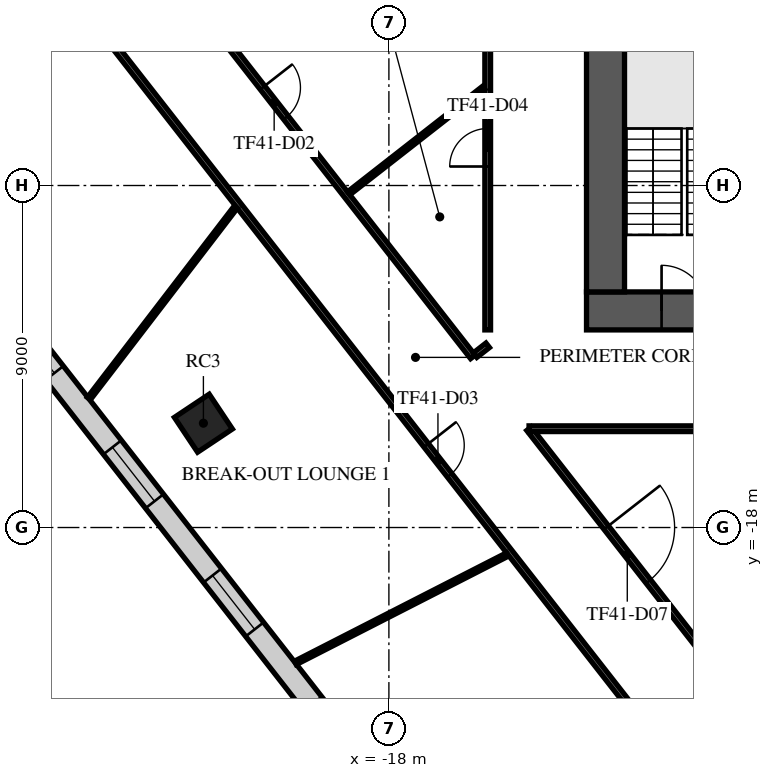
"""IFC4 building model, lengths in metres.
Left out: names, types, materials, properties, quantities, classifications, styles, units other than length and angle.
Written with IfcOpenShell. Run it as: python <this file> out.ifc"""

import sys

from ifc_helpers import new_model, si_unit, direction, frame, frame_2d, origin, origin_2d, place, context, subcontext, project, spatial, rectangle, extrude, element, fill, save


model = new_model("IFC4")
c1 = context("Model", 3, precision=1e-05, world=origin(), true_north=direction((0.0, 1.0)))
c2 = subcontext(c1, "Body", "Model", "MODEL_VIEW")
j1 = project(units=[si_unit("LENGTHUNIT", "METRE"), si_unit("PLANEANGLEUNIT", "RADIAN")], contexts=[c1])
p1 = place(None, origin())
s1 = spatial("IfcSite", under=j1, at=p1, CompositionType="ELEMENT")
p2 = place(p1, origin())
s2 = spatial("IfcBuilding", under=s1, at=p2, CompositionType="ELEMENT")
p3 = place(p2, frame((0.0, 0.0, 175.7)))
s3 = spatial("IfcBuildingStorey", under=s2, at=p3, CompositionType="ELEMENT", Elevation=175.7)
p4 = place(p3, frame((-22.881, -15.255, 0.0), z_axis=(0.0, 0.0, 1.0), x_axis=(0.832028680356, 0.55473261583, 0.0)))
e1 = element("IfcColumn", 1, at=p4, inside=s3, PredefinedType="COLUMN", context=c2, shape_type="SweptSolid", body=[
    extrude(rectangle(XDim=1.1, YDim=1.1, at=origin_2d()), origin(), (0.0, 0.0, 1.0), 4.0),
])
p5 = place(p3, frame((-12.8, -12.3, 0.0), z_axis=(0.0, 0.0, 1.0), x_axis=(1.0, 0.0, 0.0)))
e2 = element("IfcWall", 2, at=p5, inside=s3, PredefinedType="SHEAR", context=c2, shape_type="SweptSolid", body=[
    extrude(rectangle(XDim=25.6, YDim=1.0, at=frame_2d((12.8, 0.0))), origin(), (0.0, 0.0, 1.0), 3.6),
])
p6 = place(p5, frame((7.7, 0.0, 0.0)))
e3 = element("IfcOpeningElement", 3, at=p6, cuts=e2, PredefinedType="OPENING", context=c2, shape_type="SweptSolid", body=[
    extrude(rectangle(XDim=2.0, YDim=2.1, at=frame_2d((1.0, 1.05))), frame((0.0, 0.51, 0.0), z_axis=(0.0, -1.0, 0.0), x_axis=(1.0, 0.0, 0.0)), (0.0, 0.0, 1.0), 1.02),
])
p7 = place(p5, frame((17.825, 0.0, 0.0)))
e4 = element("IfcOpeningElement", 4, at=p7, cuts=e2, PredefinedType="OPENING", context=c2, shape_type="SweptSolid", body=[
    extrude(rectangle(XDim=1.2, YDim=2.1, at=frame_2d((0.6, 1.05))), frame((0.0, 0.51, 0.0), z_axis=(0.0, -1.0, 0.0), x_axis=(1.0, 0.0, 0.0)), (0.0, 0.0, 1.0), 1.02),
])
p8 = place(p5, frame((1.975, 0.0, 0.0)))
e5 = element("IfcOpeningElement", 5, at=p8, cuts=e2, PredefinedType="OPENING", context=c2, shape_type="SweptSolid", body=[
    extrude(rectangle(XDim=1.2, YDim=2.1, at=frame_2d((0.6, 1.05))), frame((0.0, 0.51, 0.0), z_axis=(0.0, -1.0, 0.0), x_axis=(1.0, 0.0, 0.0)), (0.0, 0.0, 1.0), 1.02),
])
p9 = place(p5, frame((22.425, 0.0, 0.0)))
e6 = element("IfcOpeningElement", 6, at=p9, cuts=e2, PredefinedType="OPENING", context=c2, shape_type="SweptSolid", body=[
    extrude(rectangle(XDim=1.2, YDim=2.1, at=frame_2d((0.6, 1.05))), frame((0.0, 0.51, 0.0), z_axis=(0.0, -1.0, 0.0), x_axis=(1.0, 0.0, 0.0)), (0.0, 0.0, 1.0), 1.02),
])
p10 = place(p3, frame((-12.3, -11.8, 0.0), z_axis=(0.0, 0.0, 1.0), x_axis=(0.0, 1.0, 0.0)))
e7 = element("IfcWall", 7, at=p10, inside=s3, PredefinedType="SHEAR", context=c2, shape_type="SweptSolid", body=[
    extrude(rectangle(XDim=23.6, YDim=1.0, at=frame_2d((11.8, 0.0))), origin(), (0.0, 0.0, 1.0), 3.6),
])
p11 = place(p10, frame((10.6, 0.0, 0.0)))
e8 = element("IfcOpeningElement", 8, at=p11, cuts=e7, PredefinedType="OPENING", context=c2, shape_type="SweptSolid", body=[
    extrude(rectangle(XDim=2.4, YDim=2.4, at=frame_2d((1.2, 1.2))), frame((0.0, 0.51, 0.0), z_axis=(0.0, -1.0, 0.0), x_axis=(1.0, 0.0, 0.0)), (0.0, 0.0, 1.0), 1.02),
])
p12 = place(p3, frame((-36.503, -1.52, 0.0), z_axis=(0.0, 0.0, 1.0), x_axis=(0.615658293455, -0.788013239546, 0.0)))
e9 = element("IfcWall", 9, at=p12, inside=s3, PredefinedType="STANDARD", context=c2, shape_type="SweptSolid", body=[
    extrude(rectangle(XDim=42.552, YDim=0.6, at=frame_2d((21.276, 0.0))), origin(), (0.0, 0.0, 1.0), 3.6),
])
p13 = place(p12, frame((1.178, 0.0, 0.9)))
e10 = element("IfcOpeningElement", 10, at=p13, cuts=e9, PredefinedType="OPENING", context=c2, shape_type="SweptSolid", body=[
    extrude(rectangle(XDim=1.8, YDim=2.1, at=frame_2d((0.9, 1.05))), frame((0.0, 0.31, 0.0), z_axis=(0.0, -1.0, 0.0), x_axis=(1.0, 0.0, 0.0)), (0.0, 0.0, 1.0), 0.62),
])
p14 = place(p12, frame((5.396, 0.0, 0.9)))
e11 = element("IfcOpeningElement", 11, at=p14, cuts=e9, PredefinedType="OPENING", context=c2, shape_type="SweptSolid", body=[
    extrude(rectangle(XDim=1.8, YDim=2.1, at=frame_2d((0.9, 1.05))), frame((0.0, 0.31, 0.0), z_axis=(0.0, -1.0, 0.0), x_axis=(1.0, 0.0, 0.0)), (0.0, 0.0, 1.0), 0.62),
])
p15 = place(p12, frame((9.676, 0.0, 0.9)))
e12 = element("IfcOpeningElement", 12, at=p15, cuts=e9, PredefinedType="OPENING", context=c2, shape_type="SweptSolid", body=[
    extrude(rectangle(XDim=1.8, YDim=2.1, at=frame_2d((0.9, 1.05))), frame((0.0, 0.31, 0.0), z_axis=(0.0, -1.0, 0.0), x_axis=(1.0, 0.0, 0.0)), (0.0, 0.0, 1.0), 0.62),
])
p16 = place(p12, frame((13.956, 0.0, 0.9)))
e13 = element("IfcOpeningElement", 13, at=p16, cuts=e9, PredefinedType="OPENING", context=c2, shape_type="SweptSolid", body=[
    extrude(rectangle(XDim=1.8, YDim=2.1, at=frame_2d((0.9, 1.05))), frame((0.0, 0.31, 0.0), z_axis=(0.0, -1.0, 0.0), x_axis=(1.0, 0.0, 0.0)), (0.0, 0.0, 1.0), 0.62),
])
p17 = place(p12, frame((18.236, 0.0, 0.9)))
e14 = element("IfcOpeningElement", 14, at=p17, cuts=e9, PredefinedType="OPENING", context=c2, shape_type="SweptSolid", body=[
    extrude(rectangle(XDim=1.8, YDim=2.1, at=frame_2d((0.9, 1.05))), frame((0.0, 0.31, 0.0), z_axis=(0.0, -1.0, 0.0), x_axis=(1.0, 0.0, 0.0)), (0.0, 0.0, 1.0), 0.62),
])
p18 = place(p12, frame((22.516, 0.0, 0.9)))
e15 = element("IfcOpeningElement", 15, at=p18, cuts=e9, PredefinedType="OPENING", context=c2, shape_type="SweptSolid", body=[
    extrude(rectangle(XDim=1.8, YDim=2.1, at=frame_2d((0.9, 1.05))), frame((0.0, 0.31, 0.0), z_axis=(0.0, -1.0, 0.0), x_axis=(1.0, 0.0, 0.0)), (0.0, 0.0, 1.0), 0.62),
])
p19 = place(p12, frame((26.796, 0.0, 0.9)))
e16 = element("IfcOpeningElement", 16, at=p19, cuts=e9, PredefinedType="OPENING", context=c2, shape_type="SweptSolid", body=[
    extrude(rectangle(XDim=1.8, YDim=2.1, at=frame_2d((0.9, 1.05))), frame((0.0, 0.31, 0.0), z_axis=(0.0, -1.0, 0.0), x_axis=(1.0, 0.0, 0.0)), (0.0, 0.0, 1.0), 0.62),
])
p20 = place(p12, frame((35.356, 0.0, 0.9)))
e17 = element("IfcOpeningElement", 17, at=p20, cuts=e9, PredefinedType="OPENING", context=c2, shape_type="SweptSolid", body=[
    extrude(rectangle(XDim=1.8, YDim=2.1, at=frame_2d((0.9, 1.05))), frame((0.0, 0.31, 0.0), z_axis=(0.0, -1.0, 0.0), x_axis=(1.0, 0.0, 0.0)), (0.0, 0.0, 1.0), 0.62),
])
p21 = place(p12, frame((39.573, 0.0, 0.9)))
e18 = element("IfcOpeningElement", 18, at=p21, cuts=e9, PredefinedType="OPENING", context=c2, shape_type="SweptSolid", body=[
    extrude(rectangle(XDim=1.8, YDim=2.1, at=frame_2d((0.9, 1.05))), frame((0.0, 0.31, 0.0), z_axis=(0.0, -1.0, 0.0), x_axis=(1.0, 0.0, 0.0)), (0.0, 0.0, 1.0), 0.62),
])
p22 = place(p3, frame((-26.789, -3.331, 0.0), z_axis=(0.0, 0.0, 1.0), x_axis=(0.615659714696, -0.788012129158, 0.0)))
e19 = element("IfcWall", 19, at=p22, inside=s3, PredefinedType="PARTITIONING", context=c2, shape_type="SweptSolid", body=[
    extrude(rectangle(XDim=27.811, YDim=0.15, at=frame_2d((13.905, 0.0))), origin(), (0.0, 0.0, 1.0), 3.15),
])
p23 = place(p22, frame((15.872, 0.0, 0.0)))
e20 = element("IfcOpeningElement", 20, at=p23, cuts=e19, PredefinedType="OPENING", context=c2, shape_type="SweptSolid", body=[
    extrude(rectangle(XDim=1.0, YDim=2.1, at=frame_2d((0.5, 1.05))), frame((0.0, 0.085, 0.0), z_axis=(0.0, -1.0, 0.0), x_axis=(1.0, 0.0, 0.0)), (0.0, 0.0, 1.0), 0.17),
])
p24 = place(p3, frame((-24.898, -1.854, 0.0), z_axis=(0.0, 0.0, 1.0), x_axis=(0.615662298675, -0.788010110335, 0.0)))
e21 = element("IfcWall", 21, at=p24, inside=s3, PredefinedType="PARTITIONING", context=c2, shape_type="SweptSolid", body=[
    extrude(rectangle(XDim=14.792, YDim=0.15, at=frame_2d((7.396, 0.0))), origin(), (0.0, 0.0, 1.0), 3.15),
])
p25 = place(p24, frame((5.8, 0.0, 0.0)))
e22 = element("IfcOpeningElement", 22, at=p25, cuts=e21, PredefinedType="OPENING", context=c2, shape_type="SweptSolid", body=[
    extrude(rectangle(XDim=1.0, YDim=2.1, at=frame_2d((0.5, 1.05))), frame((0.0, 0.085, 0.0), z_axis=(0.0, -1.0, 0.0), x_axis=(1.0, 0.0, 0.0)), (0.0, 0.0, 1.0), 0.17),
])
p26 = place(p3, frame((-15.732, -13.464, 0.0), z_axis=(0.0, 0.0, 1.0), x_axis=(0.788507933506, 0.615024583897, 0.0)))
e23 = element("IfcWall", 23, at=p26, inside=s3, PredefinedType="PARTITIONING", context=c2, shape_type="SweptSolid", body=[
    extrude(rectangle(XDim=0.421, YDim=0.15, at=frame_2d((0.21, 0.0))), origin(), (0.0, 0.0, 1.0), 3.15),
])
p27 = place(p3, frame((-15.4, -12.8, 0.0), z_axis=(0.0, 0.0, 1.0), x_axis=(0.0, 1.0, 0.0)))
e24 = element("IfcWall", 24, at=p27, inside=s3, PredefinedType="PARTITIONING", context=c2, shape_type="SweptSolid", body=[
    extrude(rectangle(XDim=22.392, YDim=0.15, at=frame_2d((11.196, 0.0))), origin(), (0.0, 0.0, 1.0), 3.15),
])
p28 = place(p27, frame((9.721, 0.0, 0.0)))
e25 = element("IfcOpeningElement", 25, at=p28, cuts=e24, PredefinedType="OPENING", context=c2, shape_type="SweptSolid", body=[
    extrude(rectangle(XDim=1.8, YDim=2.1, at=frame_2d((0.9, 1.05))), frame((0.0, 0.085, 0.0), z_axis=(0.0, -1.0, 0.0), x_axis=(1.0, 0.0, 0.0)), (0.0, 0.0, 1.0), 0.17),
])
p29 = place(p27, frame((4.3, 0.0, 0.0)))
e26 = element("IfcOpeningElement", 26, at=p29, cuts=e24, PredefinedType="OPENING", context=c2, shape_type="SweptSolid", body=[
    extrude(rectangle(XDim=1.0, YDim=2.1, at=frame_2d((0.5, 1.05))), frame((0.0, 0.085, 0.0), z_axis=(0.0, -1.0, 0.0), x_axis=(1.0, 0.0, 0.0)), (0.0, 0.0, 1.0), 0.17),
])
p30 = place(p27, frame((17.408, 0.0, 0.0)))
e27 = element("IfcOpeningElement", 27, at=p30, cuts=e24, PredefinedType="OPENING", context=c2, shape_type="SweptSolid", body=[
    extrude(rectangle(XDim=1.0, YDim=2.1, at=frame_2d((0.5, 1.05))), frame((0.0, 0.085, 0.0), z_axis=(0.0, -1.0, 0.0), x_axis=(1.0, 0.0, 0.0)), (0.0, 0.0, 1.0), 0.17),
])
p31 = place(p3, frame((-14.313, -15.401, 0.0), z_axis=(0.0, 0.0, 1.0), x_axis=(0.615613702547, -0.78804807546, 0.0)))
e28 = element("IfcWall", 28, at=p31, inside=s3, PredefinedType="PARTITIONING", context=c2, shape_type="SweptSolid", body=[
    extrude(rectangle(XDim=10.619, YDim=0.15, at=frame_2d((5.31, 0.0))), origin(), (0.0, 0.0, 1.0), 3.15),
])
p32 = place(p31, frame((3.3, 0.0, 0.0)))
e29 = element("IfcOpeningElement", 29, at=p32, cuts=e28, PredefinedType="OPENING", context=c2, shape_type="SweptSolid", body=[
    extrude(rectangle(XDim=1.8, YDim=2.1, at=frame_2d((0.9, 1.05))), frame((0.0, 0.085, 0.0), z_axis=(0.0, -1.0, 0.0), x_axis=(1.0, 0.0, 0.0)), (0.0, 0.0, 1.0), 0.17),
])
p33 = place(p3, frame((-14.312, -15.4, 0.0), z_axis=(0.0, 0.0, 1.0), x_axis=(1.0, 0.0, 0.0)))
e30 = element("IfcWall", 30, at=p33, inside=s3, PredefinedType="PARTITIONING", context=c2, shape_type="SweptSolid", body=[
    extrude(rectangle(XDim=22.125, YDim=0.15, at=frame_2d((11.062, 0.0))), origin(), (0.0, 0.0, 1.0), 3.15),
])
p34 = place(p3, frame((-25.895, -14.607, 0.0), z_axis=(0.0, 0.0, 1.0), x_axis=(0.608671960686, 0.793421983735, 0.0)))
e31 = element("IfcWall", 31, at=p34, inside=s3, PredefinedType="PARTITIONING", context=c2, shape_type="SweptSolid", body=[
    extrude(rectangle(XDim=6.352, YDim=0.1, at=frame_2d((3.176, 0.0))), origin(), (0.0, 0.0, 1.0), 2.9),
])
p35 = place(p3, frame((-20.461, -21.562, 0.0), z_axis=(0.0, 0.0, 1.0), x_axis=(0.890433278589, 0.455113805966, 0.0)))
e32 = element("IfcWall", 32, at=p35, inside=s3, PredefinedType="PARTITIONING", context=c2, shape_type="SweptSolid", body=[
    extrude(rectangle(XDim=6.266, YDim=0.1, at=frame_2d((3.133, 0.0))), origin(), (0.0, 0.0, 1.0), 2.9),
])
p36 = place(p3, frame((-19.059, -9.206, 0.0), z_axis=(0.0, 0.0, 1.0), x_axis=(0.787985790325, 0.615693425534, 0.0)))
e33 = element("IfcWall", 33, at=p36, inside=s3, PredefinedType="PARTITIONING", context=c2, shape_type="SweptSolid", body=[
    extrude(rectangle(XDim=4.509, YDim=0.1, at=frame_2d((2.254, 0.0))), origin(), (0.0, 0.0, 1.0), 3.6),
])
p37 = place(p8, origin())
e34 = element("IfcDoor", 34, at=p37, inside=s3, OperationType="SINGLE_SWING_LEFT", PredefinedType="DOOR", context=c2, shape_type="SweptSolid", body=[
    extrude(rectangle(XDim=1.2, YDim=2.1, at=frame_2d((0.6, 1.05))), frame((0.0, 0.025, 0.0), z_axis=(0.0, -1.0, 0.0), x_axis=(1.0, 0.0, 0.0)), (0.0, 0.0, 1.0), 0.05),
])
fill(e5, e34)
p38 = place(p16, origin())
e35 = element("IfcWindow", 35, at=p38, inside=s3, PartitioningType="SINGLE_PANEL", PredefinedType="WINDOW", context=c2, shape_type="SweptSolid", body=[
    extrude(rectangle(XDim=1.8, YDim=2.1, at=frame_2d((0.9, 1.05))), frame((0.0, 0.03, 0.0), z_axis=(0.0, -1.0, 0.0), x_axis=(1.0, 0.0, 0.0)), (0.0, 0.0, 1.0), 0.06),
])
fill(e13, e35)
p39 = place(p17, origin())
e36 = element("IfcWindow", 36, at=p39, inside=s3, PartitioningType="SINGLE_PANEL", PredefinedType="WINDOW", context=c2, shape_type="SweptSolid", body=[
    extrude(rectangle(XDim=1.8, YDim=2.1, at=frame_2d((0.9, 1.05))), frame((0.0, 0.03, 0.0), z_axis=(0.0, -1.0, 0.0), x_axis=(1.0, 0.0, 0.0)), (0.0, 0.0, 1.0), 0.06),
])
fill(e14, e36)
p40 = place(p18, origin())
e37 = element("IfcWindow", 37, at=p40, inside=s3, PartitioningType="SINGLE_PANEL", PredefinedType="WINDOW", context=c2, shape_type="SweptSolid", body=[
    extrude(rectangle(XDim=1.8, YDim=2.1, at=frame_2d((0.9, 1.05))), frame((0.0, 0.03, 0.0), z_axis=(0.0, -1.0, 0.0), x_axis=(1.0, 0.0, 0.0)), (0.0, 0.0, 1.0), 0.06),
])
fill(e15, e37)
p41 = place(p25, origin())
e38 = element("IfcDoor", 38, at=p41, inside=s3, OperationType="SINGLE_SWING_LEFT", PredefinedType="DOOR", context=c2, shape_type="SweptSolid", body=[
    extrude(rectangle(XDim=1.0, YDim=2.1, at=frame_2d((0.5, 1.05))), frame((0.0, 0.025, 0.0), z_axis=(0.0, -1.0, 0.0), x_axis=(1.0, 0.0, 0.0)), (0.0, 0.0, 1.0), 0.05),
])
fill(e22, e38)
p42 = place(p23, frame((1.0, 0.0, 0.0), z_axis=(0.0, 0.0, 1.0), x_axis=(-1.0, 0.0, 0.0)))
e39 = element("IfcDoor", 39, at=p42, inside=s3, OperationType="SINGLE_SWING_RIGHT", PredefinedType="DOOR", context=c2, shape_type="SweptSolid", body=[
    extrude(rectangle(XDim=1.0, YDim=2.1, at=frame_2d((0.5, 1.05))), frame((0.0, 0.025, 0.0), z_axis=(0.0, -1.0, 0.0), x_axis=(1.0, 0.0, 0.0)), (0.0, 0.0, 1.0), 0.05),
])
fill(e20, e39)
p43 = place(p29, origin())
e40 = element("IfcDoor", 40, at=p43, inside=s3, OperationType="SINGLE_SWING_RIGHT", PredefinedType="DOOR", context=c2, shape_type="SweptSolid", body=[
    extrude(rectangle(XDim=1.0, YDim=2.1, at=frame_2d((0.5, 1.05))), frame((0.0, 0.025, 0.0), z_axis=(0.0, -1.0, 0.0), x_axis=(1.0, 0.0, 0.0)), (0.0, 0.0, 1.0), 0.05),
])
fill(e26, e40)
p44 = place(p32, origin())
e41 = element("IfcDoor", 41, at=p44, inside=s3, OperationType="DOUBLE_DOOR_SINGLE_SWING", PredefinedType="DOOR", context=c2, shape_type="SweptSolid", body=[
    extrude(rectangle(XDim=1.8, YDim=2.1, at=frame_2d((0.9, 1.05))), frame((0.0, 0.025, 0.0), z_axis=(0.0, -1.0, 0.0), x_axis=(1.0, 0.0, 0.0)), (0.0, 0.0, 1.0), 0.05),
])
fill(e29, e41)
save(model, sys.argv[1])
